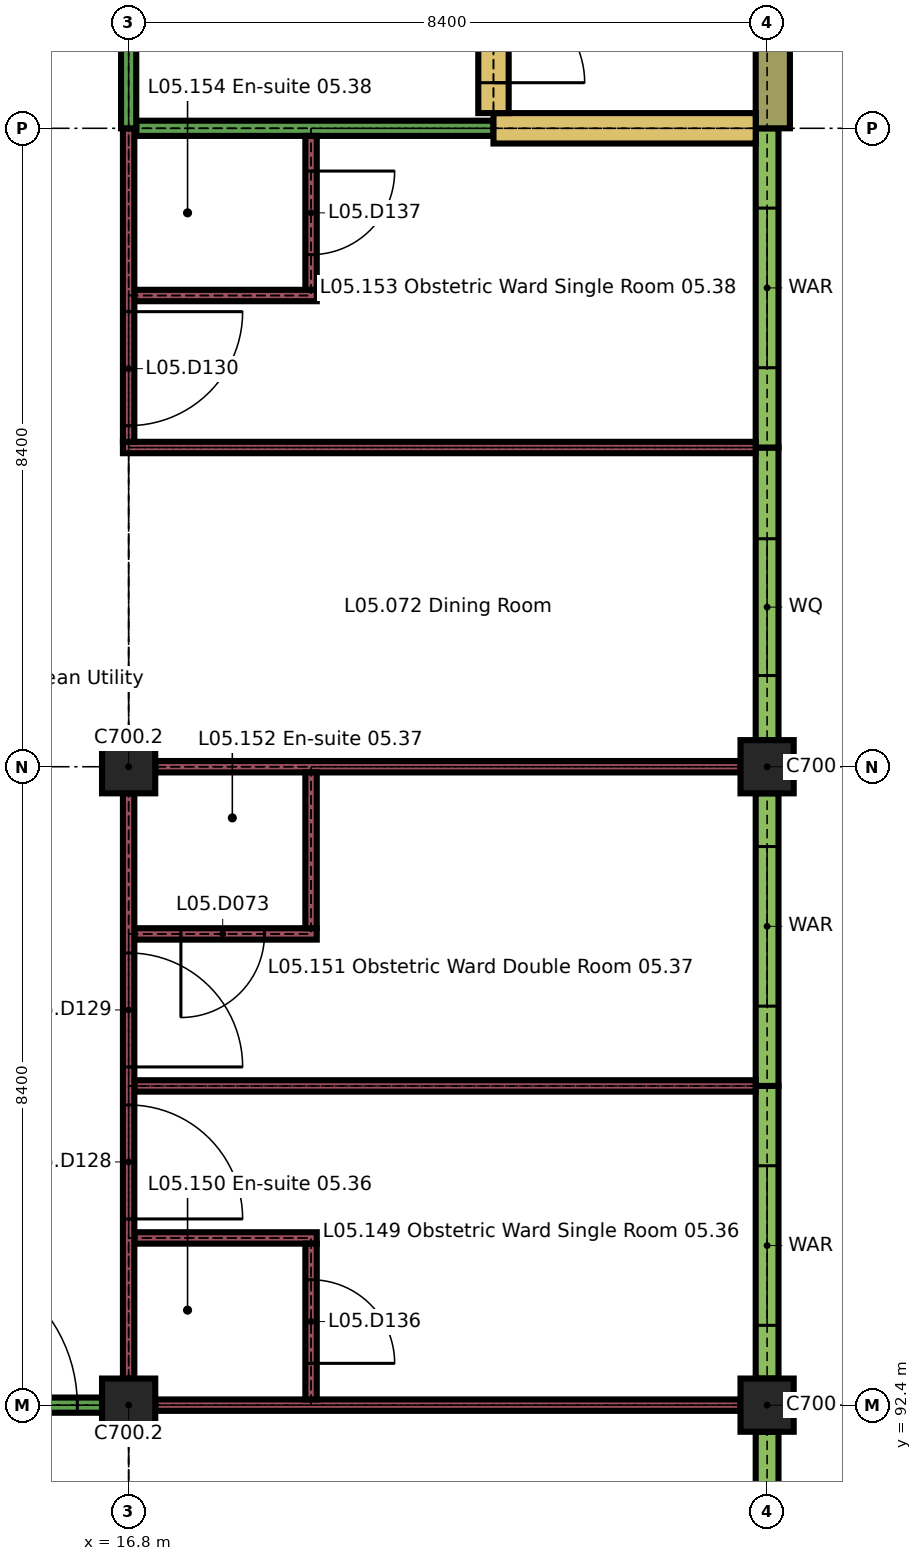
"""IFC4 building model, lengths in metres.
Left out: names, types, materials, properties, quantities, classifications, styles, units other than length and angle.
Written with IfcOpenShell. Run it as: python <this file> out.ifc"""

import sys

from ifc_helpers import new_model, si_unit, direction, frame, frame_2d, origin, origin_2d, place, context, subcontext, project, spatial, rectangle, extrude, element, fill, save


model = new_model("IFC4")
c1 = context("Model", 3, precision=1e-05, world=origin(), true_north=direction((0.0, 1.0)))
c2 = subcontext(c1, "Body", "Model", "MODEL_VIEW")
j1 = project(units=[si_unit("LENGTHUNIT", "METRE"), si_unit("PLANEANGLEUNIT", "RADIAN")], contexts=[c1])
p1 = place(None, origin())
s1 = spatial("IfcSite", under=j1, at=p1, CompositionType="ELEMENT")
p2 = place(p1, origin())
s2 = spatial("IfcBuilding", under=s1, at=p2, CompositionType="ELEMENT")
p3 = place(p2, frame((0.0, 0.0, 22.5)))
s3 = spatial("IfcBuildingStorey", under=s2, at=p3, CompositionType="ELEMENT", Elevation=22.5)
for number, where, z_axis, x_axis in (
    (1, (16.8, 92.4, 0.0), (0.0, 0.0, 1.0), (1.0, 0.0, 0.0)),
    (2, (25.2, 92.4, 0.0), (0.0, 0.0, 1.0), (1.0, 0.0, 0.0)),
    (3, (16.8, 100.8, 0.0), (0.0, 0.0, 1.0), (1.0, 0.0, 0.0)),
    (4, (25.2, 100.8, 0.0), (0.0, 0.0, 1.0), (1.0, 0.0, 0.0)),
):
    element("IfcColumn", number, at=place(p3, frame(where, z_axis=z_axis, x_axis=x_axis)), inside=s3, PredefinedType="COLUMN", context=c2, shape_type="SweptSolid", body=[
        extrude(rectangle(XDim=0.7, YDim=0.7, at=origin_2d()), origin(), (0.0, 0.0, 1.0), 3.26),
    ])
p4 = place(p3, frame((25.2, 90.9, 0.0), z_axis=(0.0, 0.0, 1.0), x_axis=(0.0, 1.0, 0.0)))
e5 = element("IfcWall", 5, at=p4, inside=s3, PredefinedType="SOLIDWALL", context=c2, shape_type="SweptSolid", body=[
    extrude(rectangle(XDim=1.15, YDim=0.3, at=frame_2d((0.575, 0.0))), origin(), (0.0, 0.0, 1.0), 2.96),
])
p5 = place(p3, frame((25.2, 92.75, 0.0), z_axis=(0.0, 0.0, 1.0), x_axis=(0.0, 1.0, 0.0)))
e6 = element("IfcWall", 6, at=p5, inside=s3, PredefinedType="SOLIDWALL", context=c2, shape_type="SweptSolid", body=[
    extrude(rectangle(XDim=3.85, YDim=0.3, at=frame_2d((1.925, 0.0))), origin(), (0.0, 0.0, 1.0), 2.96),
])
p6 = place(p5, frame((0.7, 0.0, 0.9)))
e7 = element("IfcOpeningElement", 7, at=p6, cuts=e6, PredefinedType="OPENING", context=c2, shape_type="SweptSolid", body=[
    extrude(rectangle(XDim=2.1, YDim=1.5, at=frame_2d((1.05, 0.75))), frame((0.0, 0.16, 0.0), z_axis=(0.0, -1.0, 0.0), x_axis=(1.0, 0.0, 0.0)), (0.0, 0.0, 1.0), 0.32),
])
p7 = place(p3, frame((25.2, 96.6, 0.0), z_axis=(0.0, 0.0, 1.0), x_axis=(0.0, 1.0, 0.0)))
e8 = element("IfcWall", 8, at=p7, inside=s3, PredefinedType="SOLIDWALL", context=c2, shape_type="SweptSolid", body=[
    extrude(rectangle(XDim=3.85, YDim=0.3, at=frame_2d((1.925, 0.0))), origin(), (0.0, 0.0, 1.0), 2.96),
])
p8 = place(p7, frame((1.05, 0.0, 0.9)))
e9 = element("IfcOpeningElement", 9, at=p8, cuts=e8, PredefinedType="OPENING", context=c2, shape_type="SweptSolid", body=[
    extrude(rectangle(XDim=2.1, YDim=1.5, at=frame_2d((1.05, 0.75))), frame((0.0, 0.16, 0.0), z_axis=(0.0, -1.0, 0.0), x_axis=(1.0, 0.0, 0.0)), (0.0, 0.0, 1.0), 0.32),
])
p9 = place(p3, frame((25.2, 101.15, 0.0), z_axis=(0.0, 0.0, 1.0), x_axis=(0.0, 1.0, 0.0)))
e10 = element("IfcWall", 10, at=p9, inside=s3, PredefinedType="SOLIDWALL", context=c2, shape_type="SweptSolid", body=[
    extrude(rectangle(XDim=3.85, YDim=0.3, at=frame_2d((1.925, 0.0))), origin(), (0.0, 0.0, 1.0), 2.96),
])
p10 = place(p9, frame((0.85, 0.0, 1.05)))
e11 = element("IfcOpeningElement", 11, at=p10, cuts=e10, PredefinedType="OPENING", context=c2, shape_type="SweptSolid", body=[
    extrude(rectangle(XDim=1.8, YDim=1.2, at=frame_2d((0.9, 0.6))), frame((0.0, 0.16, 0.0), z_axis=(0.0, -1.0, 0.0), x_axis=(1.0, 0.0, 0.0)), (0.0, 0.0, 1.0), 0.32),
])
p11 = place(p3, frame((25.2, 105.0, 0.0), z_axis=(0.0, 0.0, 1.0), x_axis=(0.0, 1.0, 0.0)))
e12 = element("IfcWall", 12, at=p11, inside=s3, PredefinedType="SOLIDWALL", context=c2, shape_type="SweptSolid", body=[
    extrude(rectangle(XDim=4.2, YDim=0.3, at=frame_2d((2.1, 0.0))), origin(), (0.0, 0.0, 1.0), 2.96),
])
p12 = place(p11, frame((1.05, 0.0, 0.9)))
e13 = element("IfcOpeningElement", 13, at=p12, cuts=e12, PredefinedType="OPENING", context=c2, shape_type="SweptSolid", body=[
    extrude(rectangle(XDim=2.1, YDim=1.5, at=frame_2d((1.05, 0.75))), frame((0.0, 0.16, 0.0), z_axis=(0.0, -1.0, 0.0), x_axis=(1.0, 0.0, 0.0)), (0.0, 0.0, 1.0), 0.32),
])
p13 = place(p3, frame((25.275, 109.2, 0.0), z_axis=(0.0, 0.0, 1.0), x_axis=(0.0, 1.0, 0.0)))
e14 = element("IfcWall", 14, at=p13, inside=s3, PredefinedType="SOLIDWALL", context=c2, shape_type="SweptSolid", body=[
    extrude(rectangle(XDim=3.15, YDim=0.45, at=frame_2d((1.575, 0.0))), origin(), (0.0, 0.0, 1.0), 3.26),
])
p14 = place(p3, frame((8.75, 92.4, 0.0), z_axis=(0.0, 0.0, 1.0), x_axis=(1.0, 0.0, 0.0)))
e15 = element("IfcWall", 15, at=p14, inside=s3, PredefinedType="PARTITIONING", context=c2, shape_type="SweptSolid", body=[
    extrude(rectangle(XDim=7.7, YDim=0.2, at=frame_2d((3.85, 0.0))), origin(), (0.0, 0.0, 1.0), 3.26),
])
p15 = place(p14, frame((0.325, 0.0, 0.0)))
e16 = element("IfcOpeningElement", 16, at=p15, cuts=e15, PredefinedType="OPENING", context=c2, shape_type="SweptSolid", body=[
    extrude(rectangle(XDim=2.0, YDim=2.4, at=frame_2d((1.0, 1.2))), frame((0.0, 0.11, 0.0), z_axis=(0.0, -1.0, 0.0), x_axis=(1.0, 0.0, 0.0)), (0.0, 0.0, 1.0), 0.22),
])
p16 = place(p14, frame((5.375, 0.0, 0.0)))
e17 = element("IfcOpeningElement", 17, at=p16, cuts=e15, PredefinedType="OPENING", context=c2, shape_type="SweptSolid", body=[
    extrude(rectangle(XDim=2.0, YDim=2.4, at=frame_2d((1.0, 1.2))), frame((0.0, 0.11, 0.0), z_axis=(0.0, -1.0, 0.0), x_axis=(1.0, 0.0, 0.0)), (0.0, 0.0, 1.0), 0.22),
])
p17 = place(p3, frame((17.15, 92.4, 0.0), z_axis=(0.0, 0.0, 1.0), x_axis=(1.0, 0.0, 0.0)))
e18 = element("IfcWall", 18, at=p17, inside=s3, PredefinedType="PARTITIONING", context=c2, shape_type="SweptSolid", body=[
    extrude(rectangle(XDim=7.7, YDim=0.15, at=frame_2d((3.85, 0.0))), origin(), (0.0, 0.0, 1.0), 3.26),
])
p18 = place(p3, frame((16.875, 94.6, 0.0), z_axis=(0.0, 0.0, 1.0), x_axis=(1.0, 0.0, 0.0)))
e19 = element("IfcWall", 19, at=p18, inside=s3, PredefinedType="PARTITIONING", context=c2, shape_type="SweptSolid", body=[
    extrude(rectangle(XDim=2.4, YDim=0.15, at=frame_2d((1.2, 0.0))), origin(), (0.0, 0.0, 1.0), 3.26),
])
p19 = place(p3, frame((16.875, 96.6, 0.0), z_axis=(0.0, 0.0, 1.0), x_axis=(1.0, 0.0, 0.0)))
e20 = element("IfcWall", 20, at=p19, inside=s3, PredefinedType="PARTITIONING", context=c2, shape_type="SweptSolid", body=[
    extrude(rectangle(XDim=8.175, YDim=0.15, at=frame_2d((4.087, 0.0))), origin(), (0.0, 0.0, 1.0), 3.26),
])
p20 = place(p3, frame((16.875, 98.6, 0.0), z_axis=(0.0, 0.0, 1.0), x_axis=(1.0, 0.0, 0.0)))
e21 = element("IfcWall", 21, at=p20, inside=s3, PredefinedType="PARTITIONING", context=c2, shape_type="SweptSolid", body=[
    extrude(rectangle(XDim=2.4, YDim=0.15, at=frame_2d((1.2, 0.0))), origin(), (0.0, 0.0, 1.0), 3.26),
])
p21 = place(p20, frame((0.613, 0.0, 0.0)))
e22 = element("IfcOpeningElement", 22, at=p21, cuts=e21, PredefinedType="OPENING", context=c2, shape_type="SweptSolid", body=[
    extrude(rectangle(XDim=1.1, YDim=2.1, at=frame_2d((0.55, 1.05))), frame((0.0, 0.085, 0.0), z_axis=(0.0, -1.0, 0.0), x_axis=(1.0, 0.0, 0.0)), (0.0, 0.0, 1.0), 0.17),
])
p22 = place(p3, frame((17.15, 100.8, 0.0), z_axis=(0.0, 0.0, 1.0), x_axis=(1.0, 0.0, 0.0)))
e23 = element("IfcWall", 23, at=p22, inside=s3, PredefinedType="PARTITIONING", context=c2, shape_type="SweptSolid", body=[
    extrude(rectangle(XDim=7.7, YDim=0.15, at=frame_2d((3.85, 0.0))), origin(), (0.0, 0.0, 1.0), 3.26),
])
p23 = place(p3, frame((16.725, 105.0, 0.0), z_axis=(0.0, 0.0, 1.0), x_axis=(1.0, 0.0, 0.0)))
e24 = element("IfcWall", 24, at=p23, inside=s3, PredefinedType="PARTITIONING", context=c2, shape_type="SweptSolid", body=[
    extrude(rectangle(XDim=8.325, YDim=0.15, at=frame_2d((4.163, 0.0))), origin(), (0.0, 0.0, 1.0), 3.26),
])
p24 = place(p3, frame((16.875, 107.0, 0.0), z_axis=(0.0, 0.0, 1.0), x_axis=(1.0, 0.0, 0.0)))
e25 = element("IfcWall", 25, at=p24, inside=s3, PredefinedType="PARTITIONING", context=c2, shape_type="SweptSolid", body=[
    extrude(rectangle(XDim=2.4, YDim=0.15, at=frame_2d((1.2, 0.0))), origin(), (0.0, 0.0, 1.0), 3.26),
])
p25 = place(p3, frame((16.9, 109.2, 0.0), z_axis=(0.0, 0.0, 1.0), x_axis=(1.0, 0.0, 0.0)))
e26 = element("IfcWall", 26, at=p25, inside=s3, PredefinedType="PARTITIONING", context=c2, shape_type="SweptSolid", body=[
    extrude(rectangle(XDim=4.7, YDim=0.2, at=frame_2d((2.35, 0.0))), origin(), (0.0, 0.0, 1.0), 3.26),
])
p26 = place(p3, frame((21.6, 109.2, 0.0), z_axis=(0.0, 0.0, 1.0), x_axis=(1.0, 0.0, 0.0)))
e27 = element("IfcWall", 27, at=p26, inside=s3, PredefinedType="SHEAR", context=c2, shape_type="SweptSolid", body=[
    extrude(rectangle(XDim=3.45, YDim=0.4, at=frame_2d((1.725, 0.0))), origin(), (0.0, 0.0, 1.0), 3.26),
])
p27 = place(p3, frame((16.8, 92.75, 0.0), z_axis=(0.0, 0.0, 1.0), x_axis=(0.0, 1.0, 0.0)))
e28 = element("IfcWall", 28, at=p27, inside=s3, PredefinedType="PARTITIONING", context=c2, shape_type="SweptSolid", body=[
    extrude(rectangle(XDim=7.7, YDim=0.15, at=frame_2d((3.85, 0.0))), origin(), (0.0, 0.0, 1.0), 3.26),
])
p28 = place(p27, frame((2.1, 0.0, 0.0)))
e29 = element("IfcOpeningElement", 29, at=p28, cuts=e28, PredefinedType="OPENING", context=c2, shape_type="SweptSolid", body=[
    extrude(rectangle(XDim=1.5, YDim=2.4, at=frame_2d((0.75, 1.2))), frame((0.0, 0.085, 0.0), z_axis=(0.0, -1.0, 0.0), x_axis=(1.0, 0.0, 0.0)), (0.0, 0.0, 1.0), 0.17),
])
p29 = place(p27, frame((4.1, 0.0, 0.0)))
e30 = element("IfcOpeningElement", 30, at=p29, cuts=e28, PredefinedType="OPENING", context=c2, shape_type="SweptSolid", body=[
    extrude(rectangle(XDim=1.5, YDim=2.4, at=frame_2d((0.75, 1.2))), frame((0.0, 0.085, 0.0), z_axis=(0.0, -1.0, 0.0), x_axis=(1.0, 0.0, 0.0)), (0.0, 0.0, 1.0), 0.17),
])
p30 = place(p3, frame((16.8, 105.075, 0.0), z_axis=(0.0, 0.0, 1.0), x_axis=(0.0, 1.0, 0.0)))
e31 = element("IfcWall", 31, at=p30, inside=s3, PredefinedType="PARTITIONING", context=c2, shape_type="SweptSolid", body=[
    extrude(rectangle(XDim=4.125, YDim=0.15, at=frame_2d((2.062, 0.0))), origin(), (0.0, 0.0, 1.0), 3.26),
])
p31 = place(p30, frame((0.212, 0.0, 0.0)))
e32 = element("IfcOpeningElement", 32, at=p31, cuts=e31, PredefinedType="OPENING", context=c2, shape_type="SweptSolid", body=[
    extrude(rectangle(XDim=1.5, YDim=2.4, at=frame_2d((0.75, 1.2))), frame((0.0, 0.085, 0.0), z_axis=(0.0, -1.0, 0.0), x_axis=(1.0, 0.0, 0.0)), (0.0, 0.0, 1.0), 0.17),
])
p32 = place(p3, frame((16.8, 109.2, 0.0), z_axis=(0.0, 0.0, 1.0), x_axis=(0.0, 1.0, 0.0)))
e33 = element("IfcWall", 33, at=p32, inside=s3, PredefinedType="PARTITIONING", context=c2, shape_type="SweptSolid", body=[
    extrude(rectangle(XDim=8.25, YDim=0.2, at=frame_2d((4.125, 0.0))), origin(), (0.0, 0.0, 1.0), 3.26),
])
p33 = place(p32, frame((3.125, 0.0, 0.0)))
e34 = element("IfcOpeningElement", 34, at=p33, cuts=e33, PredefinedType="OPENING", context=c2, shape_type="SweptSolid", body=[
    extrude(rectangle(XDim=2.0, YDim=2.4, at=frame_2d((1.0, 1.2))), frame((0.0, 0.11, 0.0), z_axis=(0.0, -1.0, 0.0), x_axis=(1.0, 0.0, 0.0)), (0.0, 0.0, 1.0), 0.22),
])
p34 = place(p3, frame((19.2, 92.475, 0.0), z_axis=(0.0, 0.0, 1.0), x_axis=(0.0, 1.0, 0.0)))
e35 = element("IfcWall", 35, at=p34, inside=s3, PredefinedType="PARTITIONING", context=c2, shape_type="SweptSolid", body=[
    extrude(rectangle(XDim=2.05, YDim=0.15, at=frame_2d((1.025, 0.0))), origin(), (0.0, 0.0, 1.0), 3.26),
])
p35 = place(p34, frame((0.475, 0.0, 0.0)))
e36 = element("IfcOpeningElement", 36, at=p35, cuts=e35, PredefinedType="OPENING", context=c2, shape_type="SweptSolid", body=[
    extrude(rectangle(XDim=1.1, YDim=2.1, at=frame_2d((0.55, 1.05))), frame((0.0, 0.085, 0.0), z_axis=(0.0, -1.0, 0.0), x_axis=(1.0, 0.0, 0.0)), (0.0, 0.0, 1.0), 0.17),
])
p36 = place(p3, frame((19.2, 98.675, 0.0), z_axis=(0.0, 0.0, 1.0), x_axis=(0.0, 1.0, 0.0)))
e37 = element("IfcWall", 37, at=p36, inside=s3, PredefinedType="PARTITIONING", context=c2, shape_type="SweptSolid", body=[
    extrude(rectangle(XDim=2.05, YDim=0.15, at=frame_2d((1.025, 0.0))), origin(), (0.0, 0.0, 1.0), 3.26),
])
p37 = place(p3, frame((19.2, 107.075, 0.0), z_axis=(0.0, 0.0, 1.0), x_axis=(0.0, 1.0, 0.0)))
e38 = element("IfcWall", 38, at=p37, inside=s3, PredefinedType="PARTITIONING", context=c2, shape_type="SweptSolid", body=[
    extrude(rectangle(XDim=2.025, YDim=0.15, at=frame_2d((1.013, 0.0))), origin(), (0.0, 0.0, 1.0), 3.26),
])
p38 = place(p37, frame((0.462, 0.0, 0.0)))
e39 = element("IfcOpeningElement", 39, at=p38, cuts=e38, PredefinedType="OPENING", context=c2, shape_type="SweptSolid", body=[
    extrude(rectangle(XDim=1.1, YDim=2.1, at=frame_2d((0.55, 1.05))), frame((0.0, 0.085, 0.0), z_axis=(0.0, -1.0, 0.0), x_axis=(1.0, 0.0, 0.0)), (0.0, 0.0, 1.0), 0.17),
])
p39 = place(p3, frame((21.6, 109.4, 0.0), z_axis=(0.0, 0.0, 1.0), x_axis=(0.0, 1.0, 0.0)))
e40 = element("IfcWall", 40, at=p39, inside=s3, PredefinedType="SHEAR", context=c2, shape_type="SweptSolid", body=[
    extrude(rectangle(XDim=8.05, YDim=0.4, at=frame_2d((4.025, 0.0))), origin(), (0.0, 0.0, 1.0), 3.26),
])
p40 = place(p39, frame((0.4, 0.0, 0.0)))
e41 = element("IfcOpeningElement", 41, at=p40, cuts=e40, PredefinedType="OPENING", context=c2, shape_type="SweptSolid", body=[
    extrude(rectangle(XDim=1.2, YDim=2.1, at=frame_2d((0.6, 1.05))), frame((0.0, 0.21, 0.0), z_axis=(0.0, -1.0, 0.0), x_axis=(1.0, 0.0, 0.0)), (0.0, 0.0, 1.0), 0.42),
])
p41 = place(p6, origin())
e42 = element("IfcWindow", 42, at=p41, inside=s3, PartitioningType="DOUBLE_PANEL_VERTICAL", PredefinedType="WINDOW", context=c2, shape_type="SweptSolid", body=[
    extrude(rectangle(XDim=2.1, YDim=1.5, at=frame_2d((1.05, 0.75))), frame((0.0, 0.05, 0.0), z_axis=(0.0, -1.0, 0.0), x_axis=(1.0, 0.0, 0.0)), (0.0, 0.0, 1.0), 0.1),
])
fill(e7, e42)
p42 = place(p8, origin())
e43 = element("IfcWindow", 43, at=p42, inside=s3, PartitioningType="DOUBLE_PANEL_VERTICAL", PredefinedType="WINDOW", context=c2, shape_type="SweptSolid", body=[
    extrude(rectangle(XDim=2.1, YDim=1.5, at=frame_2d((1.05, 0.75))), frame((0.0, 0.05, 0.0), z_axis=(0.0, -1.0, 0.0), x_axis=(1.0, 0.0, 0.0)), (0.0, 0.0, 1.0), 0.1),
])
fill(e9, e43)
p43 = place(p10, origin())
e44 = element("IfcWindow", 44, at=p43, inside=s3, PartitioningType="DOUBLE_PANEL_VERTICAL", PredefinedType="WINDOW", context=c2, shape_type="SweptSolid", body=[
    extrude(rectangle(XDim=1.8, YDim=1.2, at=frame_2d((0.9, 0.6))), frame((0.0, 0.03, 0.0), z_axis=(0.0, -1.0, 0.0), x_axis=(1.0, 0.0, 0.0)), (0.0, 0.0, 1.0), 0.06),
])
fill(e11, e44)
p44 = place(p12, origin())
e45 = element("IfcWindow", 45, at=p44, inside=s3, PartitioningType="DOUBLE_PANEL_VERTICAL", PredefinedType="WINDOW", context=c2, shape_type="SweptSolid", body=[
    extrude(rectangle(XDim=2.1, YDim=1.5, at=frame_2d((1.05, 0.75))), frame((0.0, 0.05, 0.0), z_axis=(0.0, -1.0, 0.0), x_axis=(1.0, 0.0, 0.0)), (0.0, 0.0, 1.0), 0.1),
])
fill(e13, e45)
p45 = place(p16, origin())
e46 = element("IfcDoor", 46, at=p45, inside=s3, OperationType="SINGLE_SWING_RIGHT", PredefinedType="DOOR", context=c2, shape_type="SweptSolid", body=[
    extrude(rectangle(XDim=2.0, YDim=2.4, at=frame_2d((1.0, 1.2))), frame((0.0, 0.03, 0.0), z_axis=(0.0, -1.0, 0.0), x_axis=(1.0, 0.0, 0.0)), (0.0, 0.0, 1.0), 0.06),
])
fill(e17, e46)
p46 = place(p21, origin())
e47 = element("IfcDoor", 47, at=p46, inside=s3, OperationType="SINGLE_SWING_LEFT", PredefinedType="DOOR", context=c2, shape_type="SweptSolid", body=[
    extrude(rectangle(XDim=1.1, YDim=2.1, at=frame_2d((0.55, 1.05))), frame((0.0, 0.025, 0.0), z_axis=(0.0, -1.0, 0.0), x_axis=(1.0, 0.0, 0.0)), (0.0, 0.0, 1.0), 0.05),
])
fill(e22, e47)
p47 = place(p28, origin())
e48 = element("IfcDoor", 48, at=p47, inside=s3, OperationType="SINGLE_SWING_LEFT", PredefinedType="DOOR", context=c2, shape_type="SweptSolid", body=[
    extrude(rectangle(XDim=1.5, YDim=2.4, at=frame_2d((0.75, 1.2))), frame((0.0, 0.03, 0.0), z_axis=(0.0, -1.0, 0.0), x_axis=(1.0, 0.0, 0.0)), (0.0, 0.0, 1.0), 0.06),
])
fill(e29, e48)
p48 = place(p29, origin())
e49 = element("IfcDoor", 49, at=p48, inside=s3, OperationType="SINGLE_SWING_LEFT", PredefinedType="DOOR", context=c2, shape_type="SweptSolid", body=[
    extrude(rectangle(XDim=1.5, YDim=2.4, at=frame_2d((0.75, 1.2))), frame((0.0, 0.03, 0.0), z_axis=(0.0, -1.0, 0.0), x_axis=(1.0, 0.0, 0.0)), (0.0, 0.0, 1.0), 0.06),
])
fill(e30, e49)
p49 = place(p31, origin())
e50 = element("IfcDoor", 50, at=p49, inside=s3, OperationType="SINGLE_SWING_RIGHT", PredefinedType="DOOR", context=c2, shape_type="SweptSolid", body=[
    extrude(rectangle(XDim=1.5, YDim=2.4, at=frame_2d((0.75, 1.2))), frame((0.0, 0.03, 0.0), z_axis=(0.0, -1.0, 0.0), x_axis=(1.0, 0.0, 0.0)), (0.0, 0.0, 1.0), 0.06),
])
fill(e32, e50)
p50 = place(p35, origin())
e51 = element("IfcDoor", 51, at=p50, inside=s3, OperationType="SINGLE_SWING_LEFT", PredefinedType="DOOR", context=c2, shape_type="SweptSolid", body=[
    extrude(rectangle(XDim=1.1, YDim=2.1, at=frame_2d((0.55, 1.05))), frame((0.0, 0.025, 0.0), z_axis=(0.0, -1.0, 0.0), x_axis=(1.0, 0.0, 0.0)), (0.0, 0.0, 1.0), 0.05),
])
fill(e36, e51)
p51 = place(p38, origin())
e52 = element("IfcDoor", 52, at=p51, inside=s3, OperationType="SINGLE_SWING_RIGHT", PredefinedType="DOOR", context=c2, shape_type="SweptSolid", body=[
    extrude(rectangle(XDim=1.1, YDim=2.1, at=frame_2d((0.55, 1.05))), frame((0.0, 0.025, 0.0), z_axis=(0.0, -1.0, 0.0), x_axis=(1.0, 0.0, 0.0)), (0.0, 0.0, 1.0), 0.05),
])
fill(e39, e52)
p52 = place(p40, origin())
e53 = element("IfcDoor", 53, at=p52, inside=s3, OperationType="SINGLE_SWING_LEFT", PredefinedType="DOOR", context=c2, shape_type="SweptSolid", body=[
    extrude(rectangle(XDim=1.2, YDim=2.1, at=frame_2d((0.6, 1.05))), frame((0.0, 0.025, 0.0), z_axis=(0.0, -1.0, 0.0), x_axis=(1.0, 0.0, 0.0)), (0.0, 0.0, 1.0), 0.05),
])
fill(e41, e53)
save(model, sys.argv[1])
